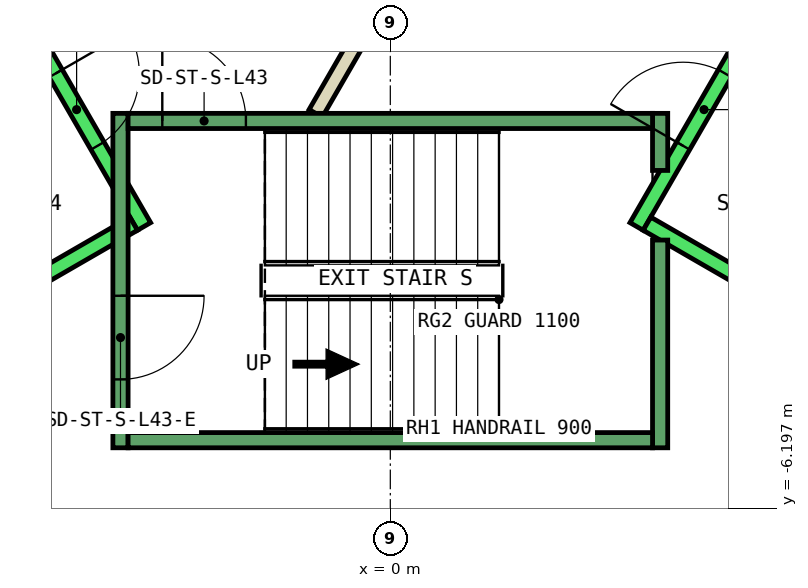
"""IFC4 building model, lengths in metres.
Left out: names, types, materials, properties, quantities, classifications, styles, units other than length and angle.
Written with IfcOpenShell. Run it as: python <this file> out.ifc"""

import sys

from ifc_helpers import new_model, si_unit, direction, frame, frame_2d, origin, place, context, subcontext, project, spatial, rectangle, extrude, element, fill, save


model = new_model("IFC4")
c1 = context("Model", 3, precision=1e-05, world=origin(), true_north=direction((0.0, 1.0)))
c2 = subcontext(c1, "Body", "Model", "MODEL_VIEW")
j1 = project(units=[si_unit("LENGTHUNIT", "METRE"), si_unit("PLANEANGLEUNIT", "RADIAN")], contexts=[c1])
p1 = place(None, origin())
s1 = spatial("IfcSite", under=j1, at=p1, CompositionType="ELEMENT")
p2 = place(p1, origin())
s2 = spatial("IfcBuilding", under=s1, at=p2, CompositionType="ELEMENT")
p3 = place(p2, frame((0.0, 0.0, 194.0)))
s3 = spatial("IfcBuildingStorey", under=s2, at=p3, CompositionType="ELEMENT", Elevation=194.0)
p4 = place(p3, frame((-0.982, -1.0, 0.0), z_axis=(0.0, 0.0, 1.0), x_axis=(0.50024047865, 0.865886518847, 0.0)))
e1 = element("IfcWall", 1, at=p4, inside=s3, PredefinedType="PARTITIONING", context=c2, shape_type="SweptSolid", body=[
    extrude(rectangle(XDim=1.863, YDim=0.2, at=frame_2d((0.931, 0.0))), origin(), (0.0, 0.0, 1.0), 3.8),
])
p5 = place(p3, frame((-5.94, 2.188, 0.0), z_axis=(0.0, 0.0, 1.0), x_axis=(0.500034260056, -0.866005622828, 0.0)))
e2 = element("IfcWall", 2, at=p5, inside=s3, PredefinedType="STANDARD", context=c2, shape_type="SweptSolid", body=[
    extrude(rectangle(XDim=5.399, YDim=0.2, at=frame_2d((2.7, 0.0))), origin(), (0.0, 0.0, 1.0), 3.8),
])
p6 = place(p5, frame((3.075, 0.0, 0.0)))
e3 = element("IfcOpeningElement", 3, at=p6, cuts=e2, PredefinedType="OPENING", context=c2, shape_type="SweptSolid", body=[
    extrude(rectangle(XDim=1.1, YDim=2.1, at=frame_2d((0.55, 1.05))), frame((0.0, 0.11, 0.0), z_axis=(0.0, -1.0, 0.0), x_axis=(1.0, 0.0, 0.0)), (0.0, 0.0, 1.0), 0.22),
])
p7 = place(p5, frame((1.225, 0.0, 0.0)))
e4 = element("IfcOpeningElement", 4, at=p7, cuts=e2, PredefinedType="OPENING", context=c2, shape_type="SweptSolid", body=[
    extrude(rectangle(XDim=1.1, YDim=2.1, at=frame_2d((0.55, 1.05))), frame((0.0, 0.11, 0.0), z_axis=(0.0, -1.0, 0.0), x_axis=(1.0, 0.0, 0.0)), (0.0, 0.0, 1.0), 0.22),
])
p8 = place(p3, frame((-3.377, -2.452, 0.0), z_axis=(0.0, 0.0, 1.0), x_axis=(-0.865955154139, -0.50012165622, 0.0)))
e5 = element("IfcWall", 5, at=p8, inside=s3, PredefinedType="STANDARD", context=c2, shape_type="SweptSolid", body=[
    extrude(rectangle(XDim=2.4, YDim=0.2, at=frame_2d((1.2, 0.0))), origin(), (0.0, 0.0, 1.0), 3.8),
])
p9 = place(p3, frame((3.24, -2.488, 0.0), z_axis=(0.0, 0.0, 1.0), x_axis=(0.500034260056, 0.866005622828, 0.0)))
e6 = element("IfcWall", 6, at=p9, inside=s3, PredefinedType="STANDARD", context=c2, shape_type="SweptSolid", body=[
    extrude(rectangle(XDim=5.399, YDim=0.2, at=frame_2d((2.7, 0.0))), origin(), (0.0, 0.0, 1.0), 3.8),
])
p10 = place(p9, frame((3.225, 0.0, 0.0)))
e7 = element("IfcOpeningElement", 7, at=p10, cuts=e6, PredefinedType="OPENING", context=c2, shape_type="SweptSolid", body=[
    extrude(rectangle(XDim=1.1, YDim=2.1, at=frame_2d((0.55, 1.05))), frame((0.0, 0.11, 0.0), z_axis=(0.0, -1.0, 0.0), x_axis=(1.0, 0.0, 0.0)), (0.0, 0.0, 1.0), 0.22),
])
p11 = place(p9, frame((1.225, 0.0, 0.0)))
e8 = element("IfcOpeningElement", 8, at=p11, cuts=e6, PredefinedType="OPENING", context=c2, shape_type="SweptSolid", body=[
    extrude(rectangle(XDim=1.1, YDim=2.1, at=frame_2d((0.55, 1.05))), frame((0.0, 0.11, 0.0), z_axis=(0.0, -1.0, 0.0), x_axis=(1.0, 0.0, 0.0)), (0.0, 0.0, 1.0), 0.22),
])
p12 = place(p3, frame((3.377, -2.452, 0.0), z_axis=(0.0, 0.0, 1.0), x_axis=(0.865955154139, -0.50012165622, 0.0)))
e9 = element("IfcWall", 9, at=p12, inside=s3, PredefinedType="STANDARD", context=c2, shape_type="SweptSolid", body=[
    extrude(rectangle(XDim=2.4, YDim=0.2, at=frame_2d((1.2, 0.0))), origin(), (0.0, 0.0, 1.0), 3.8),
])
p13 = place(p3, frame((-3.55, -1.0, 0.0), z_axis=(0.0, 0.0, 1.0), x_axis=(0.0, -1.0, 0.0)))
e10 = element("IfcWall", 10, at=p13, inside=s3, PredefinedType="STANDARD", context=c2, shape_type="SweptSolid", body=[
    extrude(rectangle(XDim=4.4, YDim=0.2, at=frame_2d((2.2, 0.0))), origin(), (0.0, 0.0, 1.0), 3.8),
])
p14 = place(p13, frame((2.4, 0.0, 0.0)))
e11 = element("IfcOpeningElement", 11, at=p14, cuts=e10, PredefinedType="OPENING", context=c2, shape_type="SweptSolid", body=[
    extrude(rectangle(XDim=1.1, YDim=2.2, at=frame_2d((0.55, 1.1))), frame((0.0, 0.11, 0.0), z_axis=(0.0, -1.0, 0.0), x_axis=(1.0, 0.0, 0.0)), (0.0, 0.0, 1.0), 0.22),
])
p15 = place(p3, frame((3.55, -2.667, 0.0), z_axis=(0.0, 0.0, 1.0), x_axis=(0.0, -1.0, 0.0)))
e12 = element("IfcWall", 12, at=p15, inside=s3, PredefinedType="STANDARD", context=c2, shape_type="SweptSolid", body=[
    extrude(rectangle(XDim=2.733, YDim=0.2, at=frame_2d((1.366, 0.0))), origin(), (0.0, 0.0, 1.0), 3.8),
])
p16 = place(p3, frame((3.55, -1.0, 0.0), z_axis=(0.0, 0.0, 1.0), x_axis=(0.0, -1.0, 0.0)))
e13 = element("IfcWall", 13, at=p16, inside=s3, PredefinedType="STANDARD", context=c2, shape_type="SweptSolid", body=[
    extrude(rectangle(XDim=0.751, YDim=0.2, at=frame_2d((0.375, 0.0))), origin(), (0.0, 0.0, 1.0), 3.8),
])
p17 = place(p3, frame((-3.45, -1.1, 0.0), z_axis=(0.0, 0.0, 1.0), x_axis=(1.0, 0.0, 0.0)))
e14 = element("IfcWall", 14, at=p17, inside=s3, PredefinedType="STANDARD", context=c2, shape_type="SweptSolid", body=[
    extrude(rectangle(XDim=6.9, YDim=0.2, at=frame_2d((3.45, 0.0))), origin(), (0.0, 0.0, 1.0), 3.8),
])
p18 = place(p17, frame((0.45, 0.0, 0.0)))
e15 = element("IfcOpeningElement", 15, at=p18, cuts=e14, PredefinedType="OPENING", context=c2, shape_type="SweptSolid", body=[
    extrude(rectangle(XDim=1.1, YDim=2.2, at=frame_2d((0.55, 1.1))), frame((0.0, 0.11, 0.0), z_axis=(0.0, -1.0, 0.0), x_axis=(1.0, 0.0, 0.0)), (0.0, 0.0, 1.0), 0.22),
])
p19 = place(p3, frame((-3.45, -5.3, 0.0), z_axis=(0.0, 0.0, 1.0), x_axis=(1.0, 0.0, 0.0)))
e16 = element("IfcWall", 16, at=p19, inside=s3, PredefinedType="STANDARD", context=c2, shape_type="SweptSolid", body=[
    extrude(rectangle(XDim=6.9, YDim=0.2, at=frame_2d((3.45, 0.0))), origin(), (0.0, 0.0, 1.0), 3.8),
])
p20 = place(p6, origin())
e17 = element("IfcDoor", 17, at=p20, inside=s3, OperationType="SLIDING_TO_LEFT", PredefinedType="DOOR", context=c2, shape_type="SweptSolid", body=[
    extrude(rectangle(XDim=1.1, YDim=2.1, at=frame_2d((0.55, 1.05))), frame((0.0, 0.025, 0.0), z_axis=(0.0, -1.0, 0.0), x_axis=(1.0, 0.0, 0.0)), (0.0, 0.0, 1.0), 0.05),
])
fill(e3, e17)
p21 = place(p11, origin())
e18 = element("IfcDoor", 18, at=p21, inside=s3, OperationType="SLIDING_TO_LEFT", PredefinedType="DOOR", context=c2, shape_type="SweptSolid", body=[
    extrude(rectangle(XDim=1.1, YDim=2.1, at=frame_2d((0.55, 1.05))), frame((0.0, 0.025, 0.0), z_axis=(0.0, -1.0, 0.0), x_axis=(1.0, 0.0, 0.0)), (0.0, 0.0, 1.0), 0.05),
])
fill(e8, e18)
p22 = place(p18, origin())
e19 = element("IfcDoor", 19, at=p22, inside=s3, OperationType="SINGLE_SWING_LEFT", PredefinedType="DOOR", context=c2, shape_type="SweptSolid", body=[
    extrude(rectangle(XDim=1.1, YDim=2.2, at=frame_2d((0.55, 1.1))), frame((0.0, 0.025, 0.0), z_axis=(0.0, -1.0, 0.0), x_axis=(1.0, 0.0, 0.0)), (0.0, 0.0, 1.0), 0.05),
])
fill(e15, e19)
p23 = place(p14, origin())
e20 = element("IfcDoor", 20, at=p23, inside=s3, OperationType="SINGLE_SWING_LEFT", PredefinedType="DOOR", context=c2, shape_type="SweptSolid", body=[
    extrude(rectangle(XDim=1.1, YDim=2.2, at=frame_2d((0.55, 1.1))), frame((0.0, 0.025, 0.0), z_axis=(0.0, -1.0, 0.0), x_axis=(1.0, 0.0, 0.0)), (0.0, 0.0, 1.0), 0.05),
])
fill(e11, e20)
save(model, sys.argv[1])
